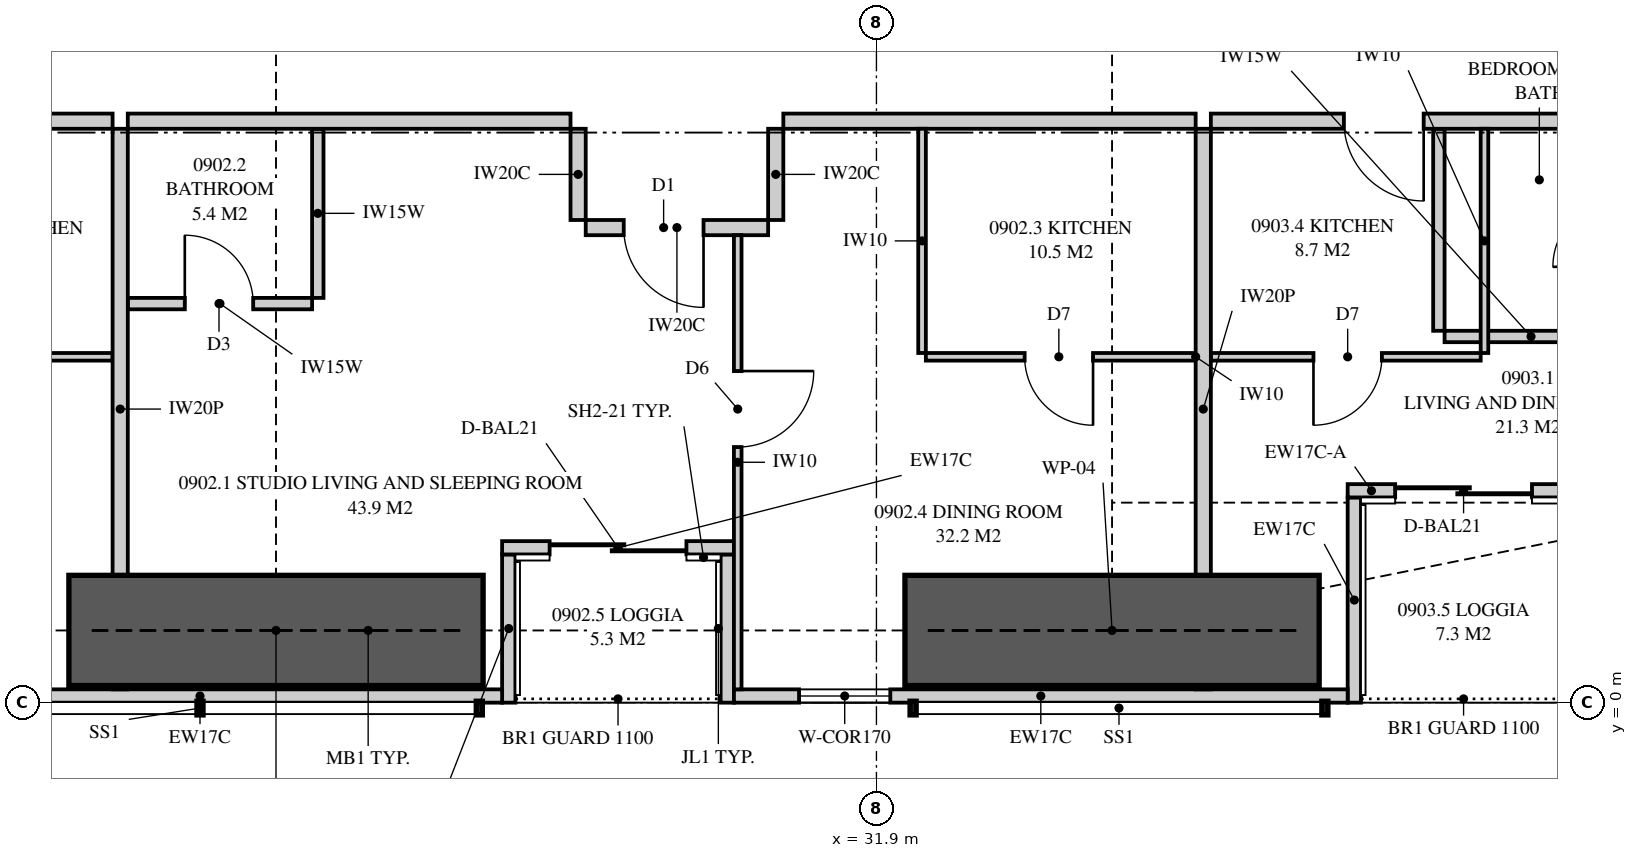
"""IFC4 building model, lengths in metres.
Left out: names, types, materials, properties, quantities, classifications, styles, units other than length and angle.
Written with IfcOpenShell. Run it as: python <this file> out.ifc"""

import sys

from ifc_helpers import new_model, si_unit, direction, frame, frame_2d, origin, place, context, subcontext, project, spatial, polyline, rectangle, outline, extrude, element, fill, save


model = new_model("IFC4")
c1 = context("Model", 3, precision=1e-05, world=origin(), true_north=direction((0.0, 1.0)))
c2 = subcontext(c1, "Body", "Model", "MODEL_VIEW")
j1 = project(units=[si_unit("LENGTHUNIT", "METRE"), si_unit("PLANEANGLEUNIT", "RADIAN")], contexts=[c1])
p1 = place(None, origin())
s1 = spatial("IfcSite", under=j1, at=p1, CompositionType="ELEMENT")
p2 = place(p1, origin())
s2 = spatial("IfcBuilding", under=s1, at=p2, CompositionType="ELEMENT")
p3 = place(p2, frame((0.0, 0.0, 37.75)))
s3 = spatial("IfcBuildingStorey", under=s2, at=p3, CompositionType="ELEMENT", Elevation=37.75)
p4 = place(p3, frame((19.025, 0.087, 0.0), z_axis=(0.0, 0.0, 1.0), x_axis=(1.0, 0.0, 0.0)))
e1 = element("IfcWall", 1, at=p4, inside=s3, PredefinedType="SOLIDWALL", context=c2, shape_type="SweptSolid", body=[
    extrude(rectangle(XDim=7.95, YDim=0.175, at=frame_2d((3.975, 0.0))), origin(), (0.0, 0.0, 1.0), 2.15),
])
p5 = place(p3, frame((30.025, 0.087, 0.0), z_axis=(0.0, 0.0, 1.0), x_axis=(1.0, 0.0, 0.0)))
e2 = element("IfcWall", 2, at=p5, inside=s3, PredefinedType="SOLIDWALL", context=c2, shape_type="SweptSolid", body=[
    extrude(outline(polyline([(0.0, 0.0), (8.075, 0.0), (8.075, 3.11), (5.179, 3.11), (5.179, 2.15), (5.131, 2.15), (5.131, 3.11), (4.975, 3.11), (4.975, 2.15), (0.0, 2.15), (0.0, 0.0)])), frame((0.0, 0.087, 0.0), z_axis=(0.0, -1.0, 0.0), x_axis=(1.0, 0.0, 0.0)), (0.0, 0.0, 1.0), 0.175),
])
p6 = place(p5, frame((0.857, 0.0, 0.4)))
e3 = element("IfcOpeningElement", 3, at=p6, cuts=e2, PredefinedType="OPENING", context=c2, shape_type="SweptSolid", body=[
    extrude(rectangle(XDim=1.2, YDim=1.7, at=frame_2d((0.6, 0.85))), frame((0.0, 0.097, 0.0), z_axis=(0.0, -1.0, 0.0), x_axis=(1.0, 0.0, 0.0)), (0.0, 0.0, 1.0), 0.195),
])
p7 = place(p3, frame((26.975, 2.038, 0.0), z_axis=(0.0, 0.0, 1.0), x_axis=(1.0, 0.0, 0.0)))
e4 = element("IfcWall", 4, at=p7, inside=s3, PredefinedType="SOLIDWALL", context=c2, shape_type="SweptSolid", body=[
    extrude(rectangle(XDim=3.05, YDim=0.175, at=frame_2d((1.525, 0.0))), origin(), (0.0, 0.0, 1.0), 3.11),
])
p8 = place(p7, frame((0.625, 0.0, 0.0)))
e5 = element("IfcOpeningElement", 5, at=p8, cuts=e4, PredefinedType="OPENING", context=c2, shape_type="SweptSolid", body=[
    extrude(rectangle(XDim=1.8, YDim=2.1, at=frame_2d((0.9, 1.05))), frame((0.0, 0.097, 0.0), z_axis=(0.0, -1.0, 0.0), x_axis=(1.0, 0.0, 0.0)), (0.0, 0.0, 1.0), 0.195),
])
for number, where, z_axis, x_axis in (
    (6, (27.062, 0.0, 0.0), (0.0, 0.0, 1.0), (0.0, 1.0, 0.0)),
    (7, (29.938, 0.0, 0.0), (0.0, 0.0, 1.0), (0.0, 1.0, 0.0)),
):
    element("IfcWall", number, at=place(p3, frame(where, z_axis=z_axis, x_axis=x_axis)), inside=s3, PredefinedType="SOLIDWALL", context=c2, shape_type="SweptSolid", body=[
        extrude(outline(polyline([(0.0, 0.0), (1.95, 0.0), (1.95, 3.11), (1.75, 3.11), (1.75, 2.15), (0.15, 2.15), (0.15, 3.11), (0.0, 3.11), (0.0, 0.0)])), frame((0.0, 0.087, 0.0), z_axis=(0.0, -1.0, 0.0), x_axis=(1.0, 0.0, 0.0)), (0.0, 0.0, 1.0), 0.175),
    ])
p9 = place(p3, frame((38.1, 2.788, 0.0), z_axis=(0.0, 0.0, 1.0), x_axis=(1.0, 0.0, 0.0)))
e8 = element("IfcWall", 8, at=p9, inside=s3, PredefinedType="SOLIDWALL", context=c2, shape_type="SweptSolid", body=[
    extrude(rectangle(XDim=0.625, YDim=0.175, at=frame_2d((0.312, 0.0))), origin(), (0.0, 0.0, 1.0), 2.51),
])
p10 = place(p3, frame((38.725, 2.788, 0.0), z_axis=(0.0, 0.0, 1.0), x_axis=(1.0, 0.0, 0.0)))
e9 = element("IfcWall", 9, at=p10, inside=s3, PredefinedType="SOLIDWALL", context=c2, shape_type="SweptSolid", body=[
    extrude(rectangle(XDim=2.425, YDim=0.175, at=frame_2d((1.212, 0.0))), origin(), (0.0, 0.0, 1.0), 2.15),
])
p11 = place(p10, origin())
e10 = element("IfcOpeningElement", 10, at=p11, cuts=e9, PredefinedType="OPENING", context=c2, shape_type="SweptSolid", body=[
    extrude(rectangle(XDim=1.8, YDim=2.1, at=frame_2d((0.9, 1.05))), frame((0.0, 0.097, 0.0), z_axis=(0.0, -1.0, 0.0), x_axis=(1.0, 0.0, 0.0)), (0.0, 0.0, 1.0), 0.195),
])
p12 = place(p3, frame((38.188, 0.0, 0.0), z_axis=(0.0, 0.0, 1.0), x_axis=(0.0, 1.0, 0.0)))
e11 = element("IfcWall", 11, at=p12, inside=s3, PredefinedType="SOLIDWALL", context=c2, shape_type="SweptSolid", body=[
    extrude(outline(polyline([(0.0, 0.0), (2.7, 0.0), (2.7, 2.51), (2.424, 2.51), (2.424, 2.15), (0.757, 2.15), (0.757, 3.11), (0.0, 3.11), (0.0, 0.0)])), frame((0.0, 0.087, 0.0), z_axis=(0.0, -1.0, 0.0), x_axis=(1.0, 0.0, 0.0)), (0.0, 0.0, 1.0), 0.175),
])
p13 = place(p3, frame((21.95, 0.175, 0.0), z_axis=(0.0, 0.0, 1.0), x_axis=(0.0, 1.0, 0.0)))
e12 = element("IfcWall", 12, at=p13, inside=s3, PredefinedType="PARTITIONING", context=c2, shape_type="SweptSolid", body=[
    extrude(outline(polyline([(0.529, 2.15), (0.0, 2.15), (0.0, 0.0), (0.529, 0.0), (0.529, 0.09), (1.021, 0.09), (1.021, 0.0), (7.375, 0.0), (7.375, 3.11), (1.685, 3.11), (1.685, 2.15), (1.021, 2.15), (1.021, 2.06), (0.529, 2.06), (0.529, 2.15)])), frame((0.0, 0.1, 0.0), z_axis=(0.0, -1.0, 0.0), x_axis=(1.0, 0.0, 0.0)), (0.0, 0.0, 1.0), 0.2),
])
p14 = place(p3, frame((17.725, 7.65, 0.0), z_axis=(0.0, 0.0, 1.0), x_axis=(1.0, 0.0, 0.0)))
e13 = element("IfcWall", 13, at=p14, inside=s3, PredefinedType="PARTITIONING", context=c2, shape_type="SweptSolid", body=[
    extrude(rectangle(XDim=4.125, YDim=0.2, at=frame_2d((2.062, 0.0))), origin(), (0.0, 0.0, 1.0), 3.11),
])
p15 = place(p14, frame((0.2, 0.0, 0.0)))
e14 = element("IfcOpeningElement", 14, at=p15, cuts=e13, PredefinedType="OPENING", context=c2, shape_type="SweptSolid", body=[
    extrude(rectangle(XDim=1.05, YDim=2.2, at=frame_2d((0.525, 1.1))), frame((0.0, 0.11, 0.0), z_axis=(0.0, -1.0, 0.0), x_axis=(1.0, 0.0, 0.0)), (0.0, 0.0, 1.0), 0.22),
])
p16 = place(p3, frame((19.2, 4.55, 0.0), z_axis=(0.0, 0.0, 1.0), x_axis=(1.0, 0.0, 0.0)))
e15 = element("IfcWall", 15, at=p16, inside=s3, PredefinedType="PARTITIONING", context=c2, shape_type="SweptSolid", body=[
    extrude(rectangle(XDim=2.65, YDim=0.1, at=frame_2d((1.325, 0.0))), origin(), (0.0, 0.0, 1.0), 3.11),
])
p17 = place(p16, frame((0.85, 0.0, 0.0)))
e16 = element("IfcOpeningElement", 16, at=p17, cuts=e15, PredefinedType="OPENING", context=c2, shape_type="SweptSolid", body=[
    extrude(rectangle(XDim=0.9, YDim=2.1, at=frame_2d((0.45, 1.05))), frame((0.0, 0.06, 0.0), z_axis=(0.0, -1.0, 0.0), x_axis=(1.0, 0.0, 0.0)), (0.0, 0.0, 1.0), 0.12),
])
p18 = place(p3, frame((36.2, 0.175, 0.0), z_axis=(0.0, 0.0, 1.0), x_axis=(0.0, 1.0, 0.0)))
e17 = element("IfcWall", 17, at=p18, inside=s3, PredefinedType="PARTITIONING", context=c2, shape_type="SweptSolid", body=[
    extrude(outline(polyline([(0.088, 3.11), (0.0, 3.11), (0.0, 0.0), (0.529, 0.0), (0.529, 0.677), (1.021, 0.677), (1.021, 0.0), (7.375, 0.0), (7.375, 3.11), (3.766, 3.11), (3.766, 2.51), (1.944, 2.51), (1.944, 2.15), (1.021, 2.15), (1.021, 1.473), (0.529, 1.473), (0.529, 2.15), (0.088, 2.15), (0.088, 3.11)])), frame((0.0, 0.1, 0.0), z_axis=(0.0, -1.0, 0.0), x_axis=(1.0, 0.0, 0.0)), (0.0, 0.0, 1.0), 0.2),
])
p19 = place(p3, frame((22.05, 7.65, 0.0), z_axis=(0.0, 0.0, 1.0), x_axis=(1.0, 0.0, 0.0)))
e18 = element("IfcWall", 18, at=p19, inside=s3, PredefinedType="PARTITIONING", context=c2, shape_type="SweptSolid", body=[
    extrude(outline(polyline([(0.0, 0.0), (5.825, 0.0), (5.825, 3.11), (2.287, 3.11), (2.287, 2.541), (1.613, 2.541), (1.613, 3.11), (0.0, 3.11), (0.0, 0.0)])), frame((0.0, 0.1, 0.0), z_axis=(0.0, -1.0, 0.0), x_axis=(1.0, 0.0, 0.0)), (0.0, 0.0, 1.0), 0.2),
])
p20 = place(p3, frame((22.05, 5.25, 0.0), z_axis=(0.0, 0.0, 1.0), x_axis=(1.0, 0.0, 0.0)))
e19 = element("IfcWall", 19, at=p20, inside=s3, PredefinedType="PLUMBINGWALL", context=c2, shape_type="SweptSolid", body=[
    extrude(outline(polyline([(0.0, 0.0), (2.425, 0.0), (2.425, 3.11), (2.262, 3.11), (2.262, 2.541), (1.638, 2.541), (1.638, 3.11), (0.0, 3.11), (0.0, 0.0)])), frame((0.0, 0.075, 0.0), z_axis=(0.0, -1.0, 0.0), x_axis=(1.0, 0.0, 0.0)), (0.0, 0.0, 1.0), 0.15),
])
p21 = place(p20, frame((0.75, 0.0, 0.0)))
e20 = element("IfcOpeningElement", 20, at=p21, cuts=e19, PredefinedType="OPENING", context=c2, shape_type="SweptSolid", body=[
    extrude(rectangle(XDim=0.9, YDim=2.1, at=frame_2d((0.45, 1.05))), frame((0.0, 0.085, 0.0), z_axis=(0.0, -1.0, 0.0), x_axis=(1.0, 0.0, 0.0)), (0.0, 0.0, 1.0), 0.17),
])
p22 = place(p3, frame((24.55, 5.325, 0.0), z_axis=(0.0, 0.0, 1.0), x_axis=(0.0, 1.0, 0.0)))
e21 = element("IfcWall", 21, at=p22, inside=s3, PredefinedType="PLUMBINGWALL", context=c2, shape_type="SweptSolid", body=[
    extrude(rectangle(XDim=2.225, YDim=0.15, at=frame_2d((1.113, 0.0))), origin(), (0.0, 0.0, 1.0), 3.11),
])
p23 = place(p3, frame((32.55, 4.55, 0.0), z_axis=(0.0, 0.0, 1.0), x_axis=(1.0, 0.0, 0.0)))
e22 = element("IfcWall", 22, at=p23, inside=s3, PredefinedType="PARTITIONING", context=c2, shape_type="SweptSolid", body=[
    extrude(outline(polyline([(0.0, 0.0), (3.55, 0.0), (3.55, 3.11), (2.737, 3.11), (2.737, 2.541), (2.163, 2.541), (2.163, 3.11), (0.0, 3.11), (0.0, 0.0)])), frame((0.0, 0.05, 0.0), z_axis=(0.0, -1.0, 0.0), x_axis=(1.0, 0.0, 0.0)), (0.0, 0.0, 1.0), 0.1),
])
p24 = place(p23, frame((1.3, 0.0, 0.0)))
e23 = element("IfcOpeningElement", 23, at=p24, cuts=e22, PredefinedType="OPENING", context=c2, shape_type="SweptSolid", body=[
    extrude(rectangle(XDim=0.9, YDim=2.1, at=frame_2d((0.45, 1.05))), frame((0.0, 0.06, 0.0), z_axis=(0.0, -1.0, 0.0), x_axis=(1.0, 0.0, 0.0)), (0.0, 0.0, 1.0), 0.12),
])
p25 = place(p3, frame((32.5, 4.6, 0.0), z_axis=(0.0, 0.0, 1.0), x_axis=(0.0, 1.0, 0.0)))
e24 = element("IfcWall", 24, at=p25, inside=s3, PredefinedType="PARTITIONING", context=c2, shape_type="SweptSolid", body=[
    extrude(rectangle(XDim=2.95, YDim=0.1, at=frame_2d((1.475, 0.0))), origin(), (0.0, 0.0, 1.0), 3.11),
])
p26 = place(p3, frame((30.075, 0.175, 0.0), z_axis=(0.0, 0.0, 1.0), x_axis=(0.0, 1.0, 0.0)))
e25 = element("IfcWall", 25, at=p26, inside=s3, PredefinedType="PARTITIONING", context=c2, shape_type="SweptSolid", body=[
    extrude(outline(polyline([(0.0, 0.0), (5.975, 0.0), (5.975, 3.11), (1.635, 3.11), (1.635, 2.15), (0.0, 2.15), (0.0, 3.11), (0.0, 0.0)])), frame((0.0, 0.05, 0.0), z_axis=(0.0, -1.0, 0.0), x_axis=(1.0, 0.0, 0.0)), (0.0, 0.0, 1.0), 0.1),
])
p27 = place(p26, frame((3.188, 0.0, 0.0)))
e26 = element("IfcOpeningElement", 26, at=p27, cuts=e25, PredefinedType="OPENING", context=c2, shape_type="SweptSolid", body=[
    extrude(rectangle(XDim=1.0, YDim=2.1, at=frame_2d((0.5, 1.05))), frame((0.0, 0.06, 0.0), z_axis=(0.0, -1.0, 0.0), x_axis=(1.0, 0.0, 0.0)), (0.0, 0.0, 1.0), 0.12),
])
p28 = place(p3, frame((36.3, 7.65, 0.0), z_axis=(0.0, 0.0, 1.0), x_axis=(1.0, 0.0, 0.0)))
e27 = element("IfcWall", 27, at=p28, inside=s3, PredefinedType="PARTITIONING", context=c2, shape_type="SweptSolid", body=[
    extrude(outline(polyline([(0.0, 0.0), (9.7, 0.0), (9.7, 3.11), (8.804, 3.11), (8.804, 2.15), (6.96, 2.15), (6.96, 3.11), (0.0, 3.11), (0.0, 0.0)])), frame((0.0, 0.1, 0.0), z_axis=(0.0, -1.0, 0.0), x_axis=(1.0, 0.0, 0.0)), (0.0, 0.0, 1.0), 0.2),
])
p29 = place(p28, frame((1.75, 0.0, 0.0)))
e28 = element("IfcOpeningElement", 28, at=p29, cuts=e27, PredefinedType="OPENING", context=c2, shape_type="SweptSolid", body=[
    extrude(rectangle(XDim=1.05, YDim=2.2, at=frame_2d((0.525, 1.1))), frame((0.0, 0.11, 0.0), z_axis=(0.0, -1.0, 0.0), x_axis=(1.0, 0.0, 0.0)), (0.0, 0.0, 1.0), 0.22),
])
p30 = place(p3, frame((39.375, 4.817, 0.0), z_axis=(0.0, 0.0, 1.0), x_axis=(1.0, 0.0, 0.0)))
e29 = element("IfcWall", 29, at=p30, inside=s3, PredefinedType="PLUMBINGWALL", context=c2, shape_type="SweptSolid", body=[
    extrude(rectangle(XDim=2.275, YDim=0.15, at=frame_2d((1.137, 0.0))), origin(), (0.0, 0.0, 1.0), 3.11),
])
p31 = place(p3, frame((39.3, 4.892, 0.0), z_axis=(0.0, 0.0, 1.0), x_axis=(0.0, 1.0, 0.0)))
e30 = element("IfcWall", 30, at=p31, inside=s3, PredefinedType="PLUMBINGWALL", context=c2, shape_type="SweptSolid", body=[
    extrude(rectangle(XDim=2.658, YDim=0.15, at=frame_2d((1.329, 0.0))), origin(), (0.0, 0.0, 1.0), 3.11),
])
p32 = place(p3, frame((36.3, 4.55, 0.0), z_axis=(0.0, 0.0, 1.0), x_axis=(1.0, 0.0, 0.0)))
e31 = element("IfcWall", 31, at=p32, inside=s3, PredefinedType="PARTITIONING", context=c2, shape_type="SweptSolid", body=[
    extrude(rectangle(XDim=3.55, YDim=0.1, at=frame_2d((1.775, 0.0))), origin(), (0.0, 0.0, 1.0), 3.11),
])
p33 = place(p32, frame((1.35, 0.0, 0.0)))
e32 = element("IfcOpeningElement", 32, at=p33, cuts=e31, PredefinedType="OPENING", context=c2, shape_type="SweptSolid", body=[
    extrude(rectangle(XDim=0.9, YDim=2.1, at=frame_2d((0.45, 1.05))), frame((0.0, 0.06, 0.0), z_axis=(0.0, -1.0, 0.0), x_axis=(1.0, 0.0, 0.0)), (0.0, 0.0, 1.0), 0.12),
])
p34 = place(p3, frame((39.9, 4.6, 0.0), z_axis=(0.0, 0.0, 1.0), x_axis=(0.0, 1.0, 0.0)))
e33 = element("IfcWall", 33, at=p34, inside=s3, PredefinedType="PARTITIONING", context=c2, shape_type="SweptSolid", body=[
    extrude(rectangle(XDim=2.95, YDim=0.1, at=frame_2d((1.475, 0.0))), origin(), (0.0, 0.0, 1.0), 3.11),
])
p35 = place(p3, frame((30.675, 7.65, 0.0), z_axis=(0.0, 0.0, 1.0), x_axis=(1.0, 0.0, 0.0)))
e34 = element("IfcWall", 34, at=p35, inside=s3, PredefinedType="PARTITIONING", context=c2, shape_type="SweptSolid", body=[
    extrude(outline(polyline([(0.0, 0.0), (5.425, 0.0), (5.425, 3.11), (4.662, 3.11), (4.662, 2.541), (3.988, 2.541), (3.988, 3.11), (0.0, 3.11), (0.0, 0.0)])), frame((0.0, 0.1, 0.0), z_axis=(0.0, -1.0, 0.0), x_axis=(1.0, 0.0, 0.0)), (0.0, 0.0, 1.0), 0.2),
])
p36 = place(p3, frame((28.075, 6.25, 0.0), z_axis=(0.0, 0.0, 1.0), x_axis=(1.0, 0.0, 0.0)))
e35 = element("IfcWall", 35, at=p36, inside=s3, PredefinedType="PARTITIONING", context=c2, shape_type="SweptSolid", body=[
    extrude(rectangle(XDim=2.4, YDim=0.2, at=frame_2d((1.2, 0.0))), origin(), (0.0, 0.0, 1.0), 3.11),
])
p37 = place(p36, frame((0.5, 0.0, 0.0)))
e36 = element("IfcOpeningElement", 36, at=p37, cuts=e35, PredefinedType="OPENING", context=c2, shape_type="SweptSolid", body=[
    extrude(rectangle(XDim=1.05, YDim=2.2, at=frame_2d((0.525, 1.1))), frame((0.0, 0.11, 0.0), z_axis=(0.0, -1.0, 0.0), x_axis=(1.0, 0.0, 0.0)), (0.0, 0.0, 1.0), 0.22),
])
for number, where, z_axis, x_axis in (
    (37, (27.975, 7.55, 0.0), (0.0, 0.0, 1.0), (0.0, -1.0, 0.0)),
    (38, (30.575, 7.55, 0.0), (0.0, 0.0, 1.0), (0.0, -1.0, 0.0)),
):
    element("IfcWall", number, at=place(p3, frame(where, z_axis=z_axis, x_axis=x_axis)), inside=s3, PredefinedType="PARTITIONING", context=c2, shape_type="SweptSolid", body=[
        extrude(rectangle(XDim=1.2, YDim=0.2, at=frame_2d((0.6, 0.0))), origin(), (0.0, 0.0, 1.0), 3.11),
    ])
for number, where, z_axis, x_axis in (
    (39, (21.275, 0.95, 0.0), (0.0, 0.0, 1.0), (1.0, 0.0, 0.0)),
    (40, (32.275, 0.95, 0.0), (0.0, 0.0, 1.0), (1.0, 0.0, 0.0)),
):
    element("IfcWall", number, at=place(p3, frame(where, z_axis=z_axis, x_axis=x_axis)), inside=s3, PredefinedType="SHEAR", context=c2, shape_type="SweptSolid", body=[
        extrude(rectangle(XDim=5.45, YDim=1.45, at=frame_2d((2.725, 0.0))), origin(), (0.0, 0.0, 1.0), 3.35),
    ])
p38 = place(p8, origin())
e41 = element("IfcDoor", 41, at=p38, inside=s3, OperationType="SLIDING_TO_LEFT", PredefinedType="DOOR", context=c2, shape_type="SweptSolid", body=[
    extrude(rectangle(XDim=1.8, YDim=2.1, at=frame_2d((0.9, 1.05))), frame((0.0, 0.025, 0.0), z_axis=(0.0, -1.0, 0.0), x_axis=(1.0, 0.0, 0.0)), (0.0, 0.0, 1.0), 0.05),
])
fill(e5, e41)
p39 = place(p6, origin())
e42 = element("IfcWindow", 42, at=p39, inside=s3, PartitioningType="SINGLE_PANEL", PredefinedType="WINDOW", context=c2, shape_type="SweptSolid", body=[
    extrude(rectangle(XDim=1.2, YDim=1.7, at=frame_2d((0.6, 0.85))), frame((0.0, 0.03, 0.0), z_axis=(0.0, -1.0, 0.0), x_axis=(1.0, 0.0, 0.0)), (0.0, 0.0, 1.0), 0.06),
])
fill(e3, e42)
p40 = place(p11, origin())
e43 = element("IfcDoor", 43, at=p40, inside=s3, OperationType="SLIDING_TO_LEFT", PredefinedType="DOOR", context=c2, shape_type="SweptSolid", body=[
    extrude(rectangle(XDim=1.8, YDim=2.1, at=frame_2d((0.9, 1.05))), frame((0.0, 0.025, 0.0), z_axis=(0.0, -1.0, 0.0), x_axis=(1.0, 0.0, 0.0)), (0.0, 0.0, 1.0), 0.05),
])
fill(e10, e43)
p41 = place(p37, frame((1.05, 0.0, 0.0), z_axis=(0.0, 0.0, 1.0), x_axis=(-1.0, 0.0, 0.0)))
e44 = element("IfcDoor", 44, at=p41, inside=s3, OperationType="SINGLE_SWING_LEFT", PredefinedType="DOOR", context=c2, shape_type="SweptSolid", body=[
    extrude(rectangle(XDim=1.05, YDim=2.2, at=frame_2d((0.525, 1.1))), frame((0.0, 0.025, 0.0), z_axis=(0.0, -1.0, 0.0), x_axis=(1.0, 0.0, 0.0)), (0.0, 0.0, 1.0), 0.05),
])
fill(e36, e44)
p42 = place(p21, origin())
e45 = element("IfcDoor", 45, at=p42, inside=s3, OperationType="SINGLE_SWING_LEFT", PredefinedType="DOOR", context=c2, shape_type="SweptSolid", body=[
    extrude(rectangle(XDim=0.9, YDim=2.1, at=frame_2d((0.45, 1.05))), frame((0.0, 0.025, 0.0), z_axis=(0.0, -1.0, 0.0), x_axis=(1.0, 0.0, 0.0)), (0.0, 0.0, 1.0), 0.05),
])
fill(e20, e45)
p43 = place(p24, frame((0.9, 0.0, 0.0), z_axis=(0.0, 0.0, 1.0), x_axis=(-1.0, 0.0, 0.0)))
e46 = element("IfcDoor", 46, at=p43, inside=s3, OperationType="SINGLE_SWING_LEFT", PredefinedType="DOOR", context=c2, shape_type="SweptSolid", body=[
    extrude(rectangle(XDim=0.9, YDim=2.1, at=frame_2d((0.45, 1.05))), frame((0.0, 0.025, 0.0), z_axis=(0.0, -1.0, 0.0), x_axis=(1.0, 0.0, 0.0)), (0.0, 0.0, 1.0), 0.05),
])
fill(e23, e46)
p44 = place(p27, frame((1.0, 0.0, 0.0), z_axis=(0.0, 0.0, 1.0), x_axis=(-1.0, 0.0, 0.0)))
e47 = element("IfcDoor", 47, at=p44, inside=s3, OperationType="SINGLE_SWING_LEFT", PredefinedType="DOOR", context=c2, shape_type="SweptSolid", body=[
    extrude(rectangle(XDim=1.0, YDim=2.1, at=frame_2d((0.5, 1.05))), frame((0.0, 0.025, 0.0), z_axis=(0.0, -1.0, 0.0), x_axis=(1.0, 0.0, 0.0)), (0.0, 0.0, 1.0), 0.05),
])
fill(e26, e47)
p45 = place(p29, frame((1.05, 0.0, 0.0), z_axis=(0.0, 0.0, 1.0), x_axis=(-1.0, 0.0, 0.0)))
e48 = element("IfcDoor", 48, at=p45, inside=s3, OperationType="SINGLE_SWING_LEFT", PredefinedType="DOOR", context=c2, shape_type="SweptSolid", body=[
    extrude(rectangle(XDim=1.05, YDim=2.2, at=frame_2d((0.525, 1.1))), frame((0.0, 0.025, 0.0), z_axis=(0.0, -1.0, 0.0), x_axis=(1.0, 0.0, 0.0)), (0.0, 0.0, 1.0), 0.05),
])
fill(e28, e48)
p46 = place(p33, frame((0.9, 0.0, 0.0), z_axis=(0.0, 0.0, 1.0), x_axis=(-1.0, 0.0, 0.0)))
e49 = element("IfcDoor", 49, at=p46, inside=s3, OperationType="SINGLE_SWING_RIGHT", PredefinedType="DOOR", context=c2, shape_type="SweptSolid", body=[
    extrude(rectangle(XDim=0.9, YDim=2.1, at=frame_2d((0.45, 1.05))), frame((0.0, 0.025, 0.0), z_axis=(0.0, -1.0, 0.0), x_axis=(1.0, 0.0, 0.0)), (0.0, 0.0, 1.0), 0.05),
])
fill(e32, e49)
save(model, sys.argv[1])
